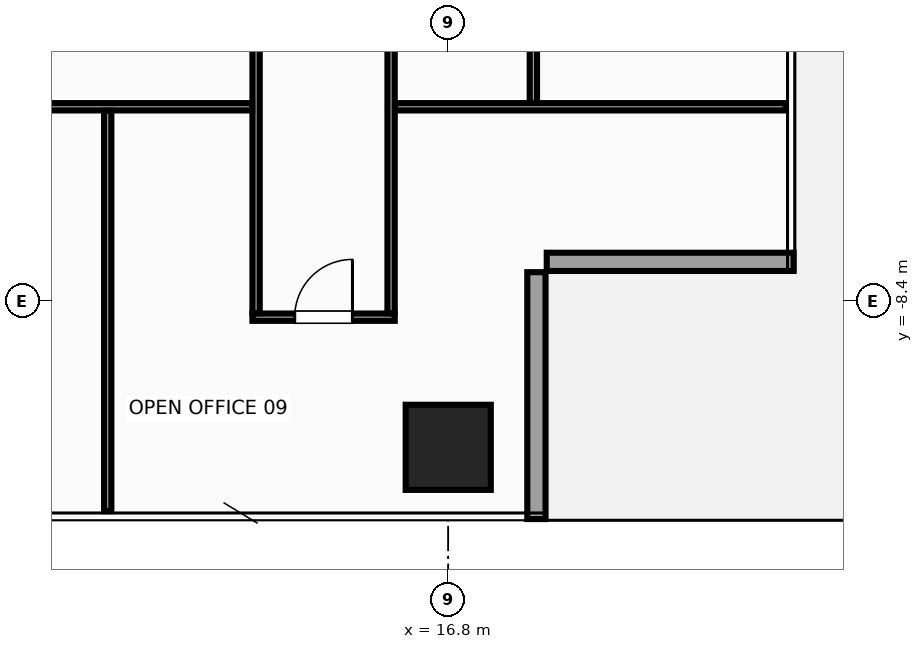
"""IFC4 building model, lengths in metres.
Left out: names, types, materials, properties, quantities, classifications, styles, units other than length and angle.
Written with IfcOpenShell. Run it as: python <this file> out.ifc"""

import sys

from ifc_helpers import new_model, si_unit, direction, frame, frame_2d, origin, origin_2d, place, context, subcontext, project, spatial, rectangle, extrude, source, transform, mapped, element, fill, save


model = new_model("IFC4")
c1 = context("Model", 3, precision=1e-05, world=origin(), true_north=direction((0.0, 1.0)))
c2 = subcontext(c1, "Body", "Model", "MODEL_VIEW")
j1 = project(units=[si_unit("LENGTHUNIT", "METRE"), si_unit("PLANEANGLEUNIT", "RADIAN")], contexts=[c1])
p1 = place(None, origin())
s1 = spatial("IfcSite", under=j1, at=p1, CompositionType="ELEMENT")
p2 = place(p1, origin())
s2 = spatial("IfcBuilding", under=s1, at=p2, CompositionType="ELEMENT")
p3 = place(p2, frame((0.0, 0.0, 228.8)))
s3 = spatial("IfcBuildingStorey", under=s2, at=p3, CompositionType="ELEMENT", Elevation=228.8)
m1 = source(origin(), c2, "Body", "SweptSolid", [
    extrude(rectangle(XDim=1.4, YDim=1.4, at=origin_2d()), origin(), (0.0, 0.0, 1.0), 3.6),
])
p4 = place(p3, frame((16.8, -10.8, 0.0), z_axis=(0.0, 0.0, 1.0), x_axis=(1.0, 0.0, 0.0)))
e1 = element("IfcColumn", 1, at=p4, inside=s3, PredefinedType="COLUMN", context=c2, shape_type="MappedRepresentation", body=[
    mapped(m1, transform((0.0, 0.0, 0.0), x_axis=(1.0, 0.0, 0.0), y_axis=(0.0, 1.0, 0.0), z_axis=(0.0, 0.0, 1.0), scale=1.0)),
])
m2 = source(origin(), c2, "Body", "SweptSolid", [
    extrude(rectangle(XDim=4.06, YDim=0.3, at=frame_2d((2.03, 0.0))), origin(), (0.0, 0.0, 1.0), 2.75),
])
for number, where, z_axis, x_axis in (
    (2, (18.25, -11.98, 0.0), (0.0, 0.0, 1.0), (0.0, 1.0, 0.0)),
    (3, (18.42, -7.75, 0.0), (0.0, 0.0, 1.0), (1.0, 0.0, 0.0)),
):
    element("IfcWall", number, at=place(p3, frame(where, z_axis=z_axis, x_axis=x_axis)), inside=s3, PredefinedType="STANDARD", context=c2, shape_type="MappedRepresentation", body=[
        mapped(m2, transform((0.0, 0.0, 0.0), x_axis=(1.0, 0.0, 0.0), y_axis=(0.0, 1.0, 0.0), z_axis=(0.0, 0.0, 1.0), scale=1.0)),
    ])
m3 = source(origin(), c2, "Body", "SweptSolid", [
    extrude(rectangle(XDim=2.34, YDim=0.12, at=frame_2d((1.17, 0.0))), origin(), (0.0, 0.0, 1.0), 3.37),
])
p5 = place(p3, frame((13.58, -8.66, 0.0), z_axis=(0.0, 0.0, 1.0), x_axis=(1.0, 0.0, 0.0)))
e4 = element("IfcWall", 4, at=p5, inside=s3, PredefinedType="PARTITIONING", context=c2, shape_type="MappedRepresentation", body=[
    mapped(m3, transform((0.0, 0.0, 0.0), x_axis=(1.0, 0.0, 0.0), y_axis=(0.0, 1.0, 0.0), z_axis=(0.0, 0.0, 1.0), scale=1.0)),
])
p6 = place(p5, frame((0.695, 0.0, 0.0)))
e5 = element("IfcOpeningElement", 5, at=p6, cuts=e4, PredefinedType="OPENING", context=c2, shape_type="SweptSolid", body=[
    extrude(rectangle(XDim=0.95, YDim=2.15, at=frame_2d((0.475, 1.075))), frame((0.0, 0.072, 0.0), z_axis=(0.0, -1.0, 0.0), x_axis=(1.0, 0.0, 0.0)), (0.0, 0.0, 1.0), 0.144),
])
m4 = source(origin(), c2, "Body", "SweptSolid", [
    extrude(rectangle(XDim=7.815, YDim=0.12, at=frame_2d((3.907, 0.0))), origin(), (0.0, 0.0, 1.0), 3.37),
])
p7 = place(p3, frame((13.64, -8.595, 0.0), z_axis=(0.0, 0.0, 1.0), x_axis=(0.0, 1.0, 0.0)))
e6 = element("IfcWall", 6, at=p7, inside=s3, PredefinedType="PARTITIONING", context=c2, shape_type="MappedRepresentation", body=[
    mapped(m4, transform((0.0, 0.0, 0.0), x_axis=(1.0, 0.0, 0.0), y_axis=(0.0, 1.0, 0.0), z_axis=(0.0, 0.0, 1.0), scale=1.0)),
])
m5 = source(origin(), c2, "Body", "SweptSolid", [
    extrude(rectangle(XDim=16.395, YDim=0.12, at=frame_2d((8.198, 0.0))), origin(), (0.0, 0.0, 1.0), 2.655),
])
p8 = place(p3, frame((15.86, -8.595, 0.0), z_axis=(0.0, 0.0, 1.0), x_axis=(0.0, 1.0, 0.0)))
e7 = element("IfcWall", 7, at=p8, inside=s3, PredefinedType="PARTITIONING", context=c2, shape_type="MappedRepresentation", body=[
    mapped(m5, transform((0.0, 0.0, 0.0), x_axis=(1.0, 0.0, 0.0), y_axis=(0.0, 1.0, 0.0), z_axis=(0.0, 0.0, 1.0), scale=1.0)),
])
m6 = source(origin(), c2, "Body", "SweptSolid", [
    extrude(rectangle(XDim=27.15, YDim=0.12, at=frame_2d((13.575, 0.0))), origin(), (0.0, 0.0, 1.0), 2.755),
])
p9 = place(p3, frame((-13.575, -5.2, 0.0), z_axis=(0.0, 0.0, 1.0), x_axis=(1.0, 0.0, 0.0)))
e8 = element("IfcWall", 8, at=p9, inside=s3, PredefinedType="PARTITIONING", context=c2, shape_type="MappedRepresentation", body=[
    mapped(m6, transform((0.0, 0.0, 0.0), x_axis=(1.0, 0.0, 0.0), y_axis=(0.0, 1.0, 0.0), z_axis=(0.0, 0.0, 1.0), scale=1.0)),
])
p10 = place(p9, frame((13.1, 0.0, 0.0)))
e9 = element("IfcOpeningElement", 9, at=p10, cuts=e8, PredefinedType="OPENING", context=c2, shape_type="SweptSolid", body=[
    extrude(rectangle(XDim=0.95, YDim=2.15, at=frame_2d((0.475, 1.075))), frame((0.0, 0.072, 0.0), z_axis=(0.0, -1.0, 0.0), x_axis=(1.0, 0.0, 0.0)), (0.0, 0.0, 1.0), 0.144),
])
m7 = source(origin(), c2, "Body", "SweptSolid", [
    extrude(rectangle(XDim=6.425, YDim=0.12, at=frame_2d((3.212, 0.0))), origin(), (0.0, 0.0, 1.0), 2.755),
])
p11 = place(p3, frame((15.925, -5.2, 0.0), z_axis=(0.0, 0.0, 1.0), x_axis=(1.0, 0.0, 0.0)))
e10 = element("IfcWall", 10, at=p11, inside=s3, PredefinedType="PARTITIONING", context=c2, shape_type="MappedRepresentation", body=[
    mapped(m7, transform((0.0, 0.0, 0.0), x_axis=(1.0, 0.0, 0.0), y_axis=(0.0, 1.0, 0.0), z_axis=(0.0, 0.0, 1.0), scale=1.0)),
])
m8 = source(origin(), c2, "Body", "SweptSolid", [
    extrude(rectangle(XDim=12.81, YDim=0.12, at=frame_2d((6.405, 0.0))), origin(), (0.0, 0.0, 1.0), 3.37),
])
p12 = place(p3, frame((18.2, -5.135, 0.0), z_axis=(0.0, 0.0, 1.0), x_axis=(0.0, 1.0, 0.0)))
e11 = element("IfcWall", 11, at=p12, inside=s3, PredefinedType="PARTITIONING", context=c2, shape_type="MappedRepresentation", body=[
    mapped(m8, transform((0.0, 0.0, 0.0), x_axis=(1.0, 0.0, 0.0), y_axis=(0.0, 1.0, 0.0), z_axis=(0.0, 0.0, 1.0), scale=1.0)),
])
m9 = source(origin(), c2, "Body", "SweptSolid", [
    extrude(rectangle(XDim=6.585, YDim=0.12, at=frame_2d((3.292, 0.0))), origin(), (0.0, 0.0, 1.0), 2.905),
])
p13 = place(p3, frame((11.2, -11.85, 0.0), z_axis=(0.0, 0.0, 1.0), x_axis=(0.0, 1.0, 0.0)))
e12 = element("IfcWall", 12, at=p13, inside=s3, PredefinedType="PARTITIONING", context=c2, shape_type="MappedRepresentation", body=[
    mapped(m9, transform((0.0, 0.0, 0.0), x_axis=(1.0, 0.0, 0.0), y_axis=(0.0, 1.0, 0.0), z_axis=(0.0, 0.0, 1.0), scale=1.0)),
])
m10 = source(origin(), c2, "Body", "SweptSolid", [
    extrude(rectangle(XDim=0.95, YDim=2.15, at=frame_2d((0.475, 1.075))), frame((0.0, 0.025, 0.0), z_axis=(0.0, -1.0, 0.0), x_axis=(1.0, 0.0, 0.0)), (0.0, 0.0, 1.0), 0.05),
])
p14 = place(p6, origin())
e13 = element("IfcDoor", 13, at=p14, inside=s3, OperationType="SINGLE_SWING_RIGHT", PredefinedType="DOOR", context=c2, shape_type="MappedRepresentation", body=[
    mapped(m10, transform((0.0, 0.0, 0.0), x_axis=(1.0, 0.0, 0.0), y_axis=(0.0, 1.0, 0.0), z_axis=(0.0, 0.0, 1.0), scale=1.0)),
])
fill(e5, e13)
save(model, sys.argv[1])
